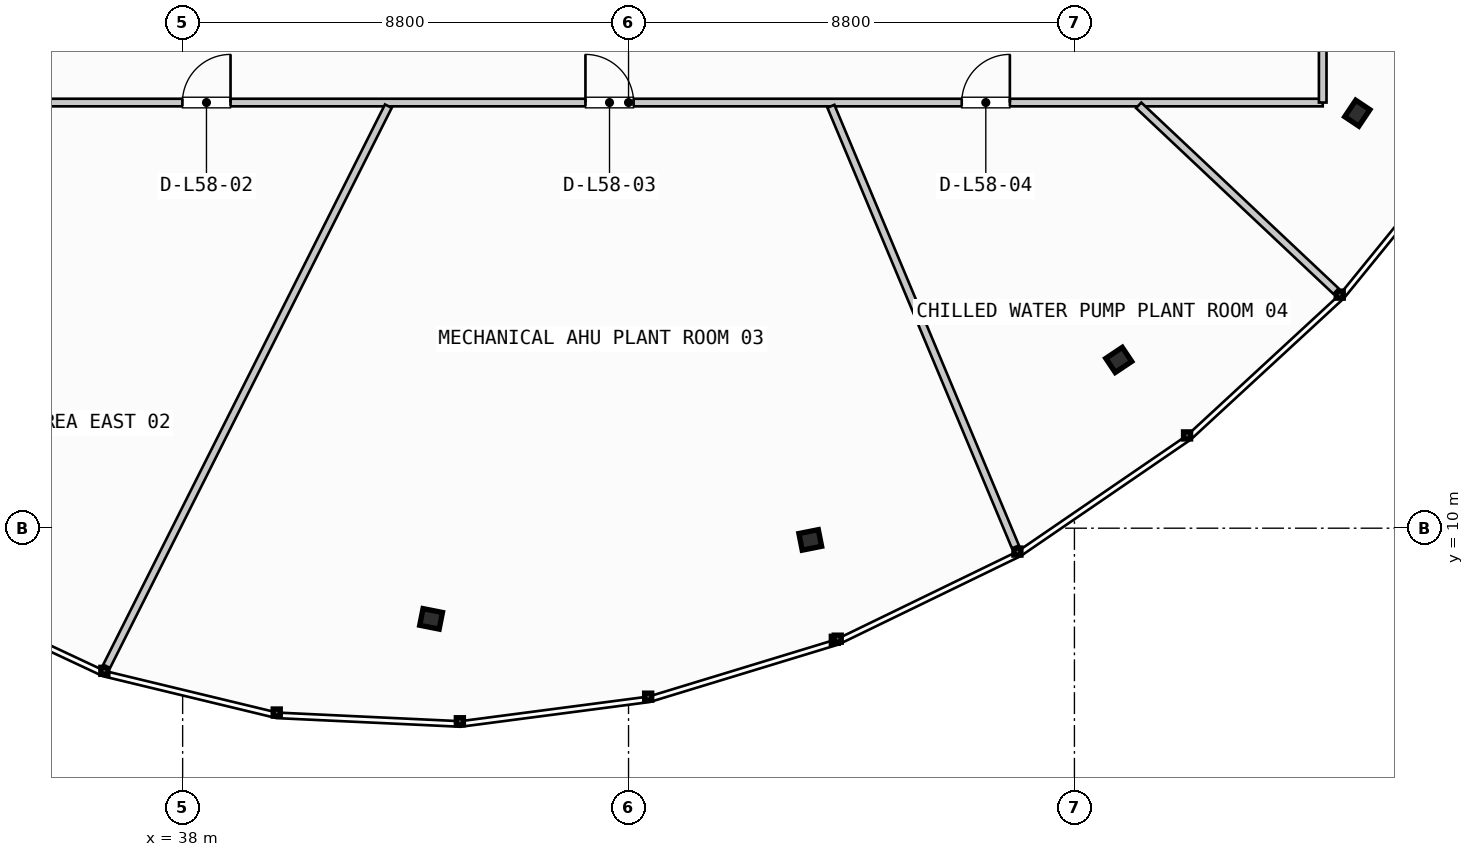
"""IFC4 building model, lengths in metres.
Left out: names, types, materials, properties, quantities, classifications, styles, units other than length and angle.
Written with IfcOpenShell. Run it as: python <this file> out.ifc"""

import sys

from ifc_helpers import new_model, si_unit, direction, frame, frame_2d, origin, origin_2d, place, context, subcontext, project, spatial, rectangle, i_section, extrude, source, transform, mapped, element, fill, save


model = new_model("IFC4")
c1 = context("Model", 3, precision=1e-05, world=origin(), true_north=direction((0.0, 1.0)))
c2 = subcontext(c1, "Body", "Model", "MODEL_VIEW")
j1 = project(units=[si_unit("LENGTHUNIT", "METRE"), si_unit("PLANEANGLEUNIT", "RADIAN")], contexts=[c1])
p1 = place(None, origin())
s1 = spatial("IfcSite", under=j1, at=p1, CompositionType="ELEMENT")
p2 = place(p1, origin())
s2 = spatial("IfcBuilding", under=s1, at=p2, CompositionType="ELEMENT")
p3 = place(p2, frame((0.0, 0.0, 223.6)))
s3 = spatial("IfcBuildingStorey", under=s2, at=p3, CompositionType="ELEMENT", Elevation=223.6)
m1 = source(origin(), c2, "Body", "SweptSolid", [
    extrude(i_section(OverallWidth=0.391, OverallDepth=0.335, WebThickness=0.023, FlangeThickness=0.034, FilletRadius=0.015, at=origin_2d()), origin(), (0.0, 0.0, 1.0), 4.38),
])
for number, where, z_axis, x_axis in (
    (1, (42.904, 8.211, 0.0), (0.0, 0.0, 1.0), (-0.195, -0.981, 0.0)),
    (2, (50.387, 9.769, 0.0), (0.0, 0.0, 1.0), (0.195, -0.981, 0.0)),
    (3, (56.475, 13.321, 0.0), (0.0, 0.0, 1.0), (0.556, -0.831, 0.0)),
    (4, (61.183, 18.19, 0.0), (0.0, 0.0, 1.0), (0.831, -0.556, 0.0)),
):
    element("IfcColumn", number, at=place(p3, frame(where, z_axis=z_axis, x_axis=x_axis)), inside=s3, PredefinedType="COLUMN", context=c2, shape_type="MappedRepresentation", body=[
        mapped(m1, transform((0.0, 0.0, 0.0), scale=1.0)),
    ])
p4 = place(p3, frame((33.1, 18.4, 0.0), z_axis=(0.0, 0.0, 1.0), x_axis=(1.0, 0.0, 0.0)))
e5 = element("IfcWall", 5, at=p4, inside=s3, PredefinedType="PARTITIONING", context=c2, shape_type="SweptSolid", body=[
    extrude(rectangle(XDim=27.4, YDim=0.15, at=frame_2d((13.7, 0.0))), origin(), (0.0, 0.0, 1.0), 2.455),
])
p5 = place(p4, frame((4.895, 0.0, 0.0)))
e6 = element("IfcOpeningElement", 6, at=p5, cuts=e5, PredefinedType="OPENING", context=c2, shape_type="SweptSolid", body=[
    extrude(rectangle(XDim=0.95, YDim=2.15, at=frame_2d((0.475, 1.075))), frame((0.0, 0.085, 0.0), z_axis=(0.0, -1.0, 0.0), x_axis=(1.0, 0.0, 0.0)), (0.0, 0.0, 1.0), 0.17),
])
p6 = place(p4, frame((12.85, 0.0, 0.0)))
e7 = element("IfcOpeningElement", 7, at=p6, cuts=e5, PredefinedType="OPENING", context=c2, shape_type="SweptSolid", body=[
    extrude(rectangle(XDim=0.95, YDim=2.15, at=frame_2d((0.475, 1.075))), frame((0.0, 0.085, 0.0), z_axis=(0.0, -1.0, 0.0), x_axis=(1.0, 0.0, 0.0)), (0.0, 0.0, 1.0), 0.17),
])
p7 = place(p4, frame((20.276, 0.0, 0.0)))
e8 = element("IfcOpeningElement", 8, at=p7, cuts=e5, PredefinedType="OPENING", context=c2, shape_type="SweptSolid", body=[
    extrude(rectangle(XDim=0.95, YDim=2.15, at=frame_2d((0.475, 1.075))), frame((0.0, 0.085, 0.0), z_axis=(0.0, -1.0, 0.0), x_axis=(1.0, 0.0, 0.0)), (0.0, 0.0, 1.0), 0.17),
])
p8 = place(p3, frame((60.5, 18.4, 0.0), z_axis=(0.0, 0.0, 1.0), x_axis=(0.0, 1.0, 0.0)))
e9 = element("IfcWall", 9, at=p8, inside=s3, PredefinedType="PARTITIONING", context=c2, shape_type="SweptSolid", body=[
    extrude(rectangle(XDim=18.8, YDim=0.15, at=frame_2d((9.4, 0.0))), origin(), (0.0, 0.0, 1.0), 2.455),
])
p9 = place(p8, frame((4.928, 0.0, 0.0)))
e10 = element("IfcOpeningElement", 10, at=p9, cuts=e9, PredefinedType="OPENING", context=c2, shape_type="SweptSolid", body=[
    extrude(rectangle(XDim=0.95, YDim=2.15, at=frame_2d((0.475, 1.075))), frame((0.0, 0.085, 0.0), z_axis=(0.0, -1.0, 0.0), x_axis=(1.0, 0.0, 0.0)), (0.0, 0.0, 1.0), 0.17),
])
p10 = place(p8, frame((13.494, 0.0, 0.0)))
e11 = element("IfcOpeningElement", 11, at=p10, cuts=e9, PredefinedType="OPENING", context=c2, shape_type="SweptSolid", body=[
    extrude(rectangle(XDim=0.95, YDim=2.15, at=frame_2d((0.475, 1.075))), frame((0.0, 0.085, 0.0), z_axis=(0.0, -1.0, 0.0), x_axis=(1.0, 0.0, 0.0)), (0.0, 0.0, 1.0), 0.17),
])
p11 = place(p3, frame((42.06, 18.329, 0.0), z_axis=(0.0, 0.0, 1.0), x_axis=(-0.449311729851, -0.893375044098, 0.0)))
e12 = element("IfcWall", 12, at=p11, inside=s3, PredefinedType="PARTITIONING", context=c2, shape_type="SweptSolid", body=[
    extrude(rectangle(XDim=12.374, YDim=0.15, at=frame_2d((6.187, 0.0))), origin(), (0.0, 0.0, 1.0), 2.455),
])
p12 = place(p3, frame((50.794, 18.326, 0.0), z_axis=(0.0, 0.0, 1.0), x_axis=(0.386357921925, -0.922348934062, 0.0)))
e13 = element("IfcWall", 13, at=p12, inside=s3, PredefinedType="PARTITIONING", context=c2, shape_type="SweptSolid", body=[
    extrude(rectangle(XDim=9.427, YDim=0.15, at=frame_2d((4.714, 0.0))), origin(), (0.0, 0.0, 1.0), 2.455),
])
p13 = place(p3, frame((56.868, 18.345, 0.0), z_axis=(0.0, 0.0, 1.0), x_axis=(0.727986933266, -0.685591004166, 0.0)))
e14 = element("IfcWall", 14, at=p13, inside=s3, PredefinedType="PARTITIONING", context=c2, shape_type="SweptSolid", body=[
    extrude(rectangle(XDim=5.35, YDim=0.15, at=frame_2d((2.675, 0.0))), origin(), (0.0, 0.0, 1.0), 2.455),
])
m2 = source(origin(), c2, "Body", "SweptSolid", [
    extrude(rectangle(XDim=0.95, YDim=2.15, at=frame_2d((0.475, 1.075))), frame((0.0, 0.025, 0.0), z_axis=(0.0, -1.0, 0.0), x_axis=(1.0, 0.0, 0.0)), (0.0, 0.0, 1.0), 0.05),
])
p14 = place(p5, origin())
e15 = element("IfcDoor", 15, at=p14, inside=s3, OperationType="SINGLE_SWING_RIGHT", PredefinedType="DOOR", context=c2, shape_type="MappedRepresentation", body=[
    mapped(m2, transform((0.0, 0.0, 0.0), scale=1.0)),
])
fill(e6, e15)
p15 = place(p6, origin())
e16 = element("IfcDoor", 16, at=p15, inside=s3, OperationType="SINGLE_SWING_LEFT", PredefinedType="DOOR", context=c2, shape_type="MappedRepresentation", body=[
    mapped(m2, transform((0.0, 0.0, 0.0), scale=1.0)),
])
fill(e7, e16)
p16 = place(p7, origin())
e17 = element("IfcDoor", 17, at=p16, inside=s3, OperationType="SINGLE_SWING_RIGHT", PredefinedType="DOOR", context=c2, shape_type="MappedRepresentation", body=[
    mapped(m2, transform((0.0, 0.0, 0.0), scale=1.0)),
])
fill(e8, e17)
save(model, sys.argv[1])
